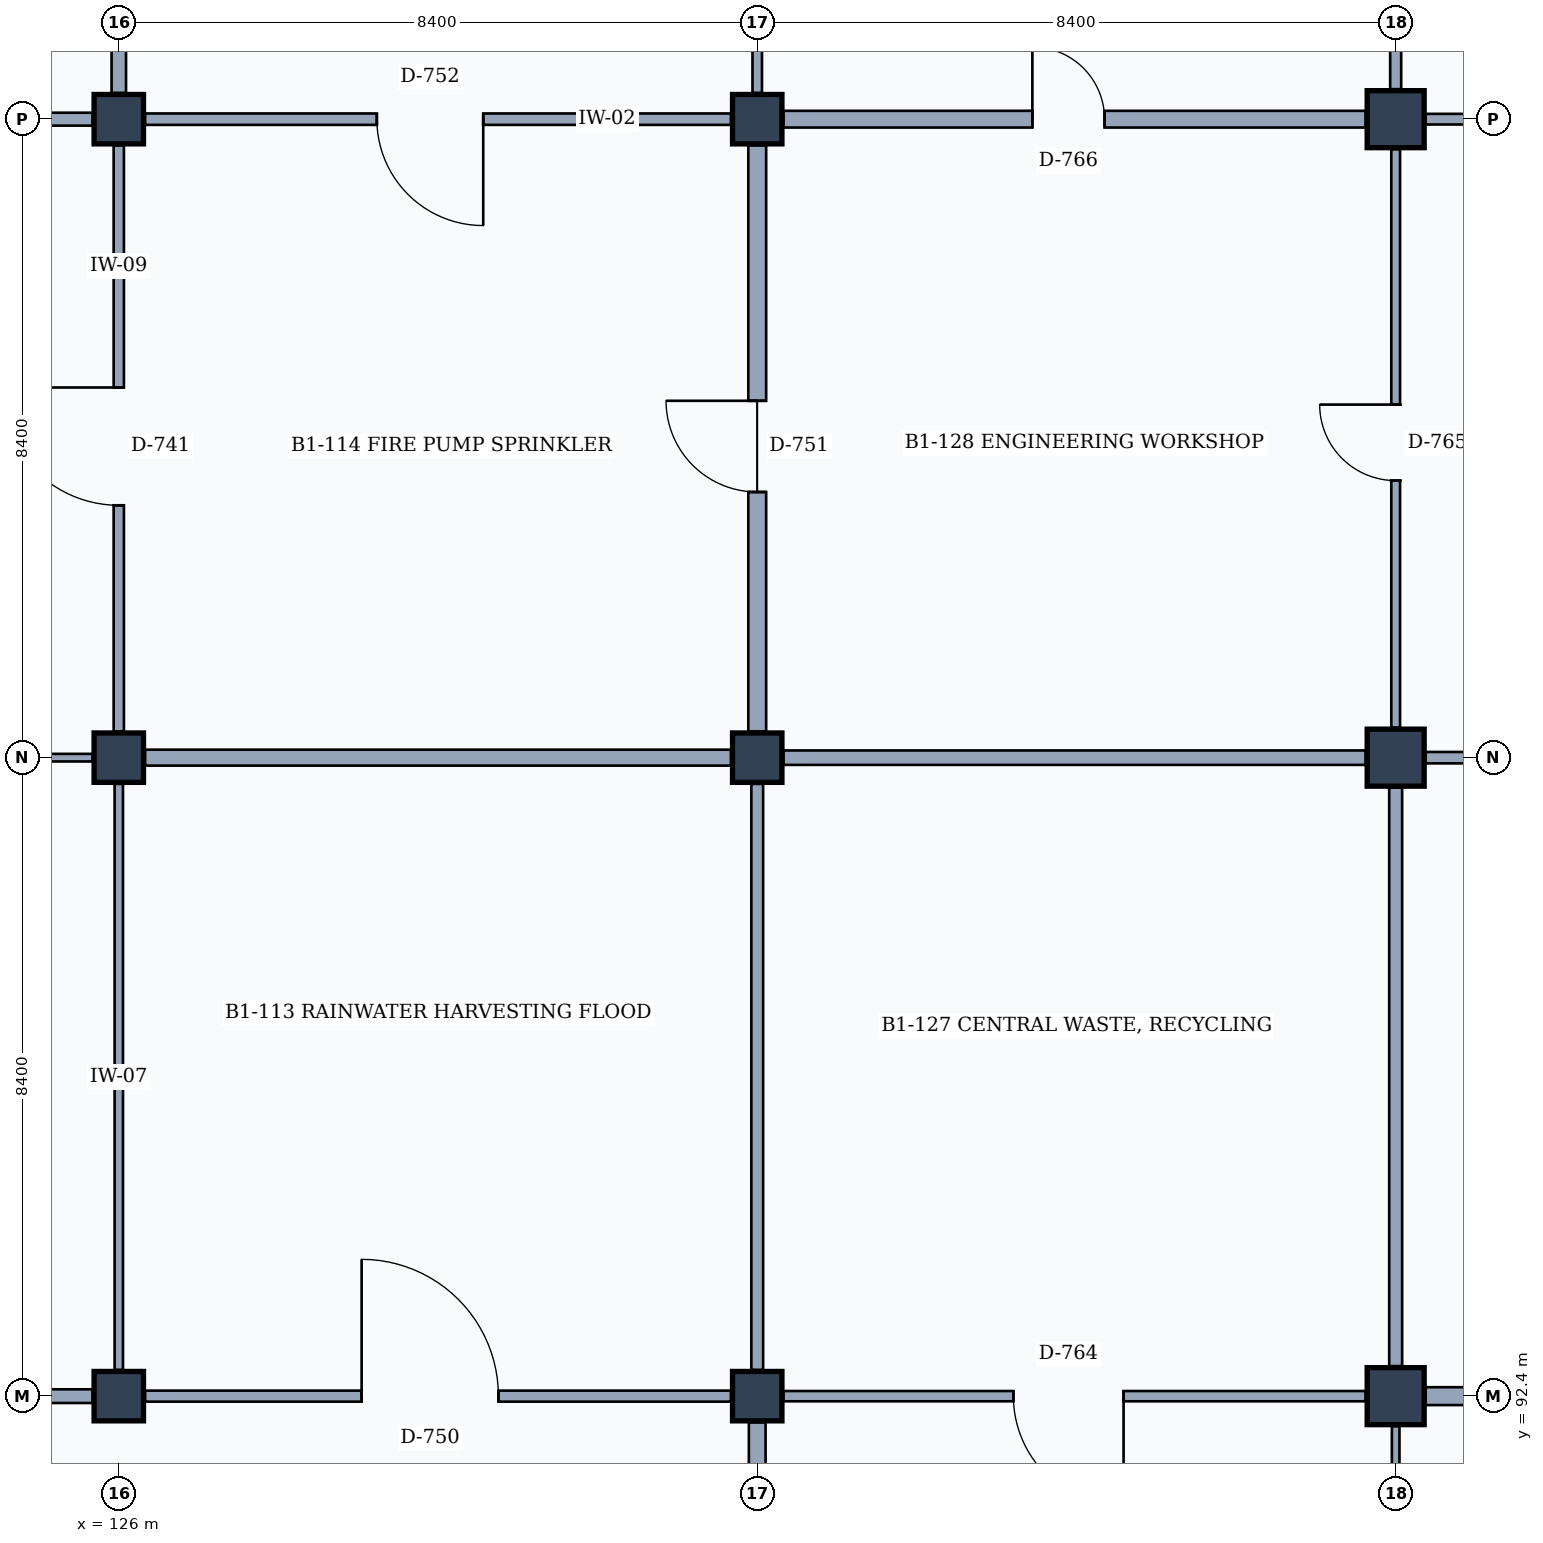
"""IFC4 building model, lengths in metres.
Left out: names, types, materials, properties, quantities, classifications, styles, units other than length and angle.
Written with IfcOpenShell. Run it as: python <this file> out.ifc"""

import sys

from ifc_helpers import new_model, si_unit, direction, frame, frame_2d, origin, origin_2d, place, context, subcontext, project, spatial, rectangle, extrude, element, fill, save


model = new_model("IFC4")
c1 = context("Model", 3, precision=1e-05, world=origin(), true_north=direction((0.0, 1.0)))
c2 = subcontext(c1, "Body", "Model", "MODEL_VIEW")
j1 = project(units=[si_unit("LENGTHUNIT", "METRE"), si_unit("PLANEANGLEUNIT", "RADIAN")], contexts=[c1])
p1 = place(None, origin())
s1 = spatial("IfcSite", under=j1, at=p1, CompositionType="ELEMENT")
p2 = place(p1, origin())
s2 = spatial("IfcBuilding", under=s1, at=p2, CompositionType="ELEMENT")
p3 = place(p2, frame((0.0, 0.0, -4.2)))
s3 = spatial("IfcBuildingStorey", under=s2, at=p3, CompositionType="ELEMENT", Elevation=-4.2)
for number, where, z_axis, x_axis in (
    (1, (126.0, 92.4, 0.0), (0.0, 0.0, 1.0), (1.0, 0.0, 0.0)),
    (2, (126.0, 100.8, 0.0), (0.0, 0.0, 1.0), (1.0, 0.0, 0.0)),
    (3, (126.0, 109.2, 0.0), (0.0, 0.0, 1.0), (1.0, 0.0, 0.0)),
    (4, (134.4, 92.4, 0.0), (0.0, 0.0, 1.0), (1.0, 0.0, 0.0)),
    (5, (134.4, 100.8, 0.0), (0.0, 0.0, 1.0), (1.0, 0.0, 0.0)),
    (6, (134.4, 109.2, 0.0), (0.0, 0.0, 1.0), (1.0, 0.0, 0.0)),
):
    element("IfcColumn", number, at=place(p3, frame(where, z_axis=z_axis, x_axis=x_axis)), inside=s3, PredefinedType="COLUMN", context=c2, shape_type="SweptSolid", body=[
        extrude(rectangle(XDim=0.65, YDim=0.65, at=origin_2d()), origin(), (0.0, 0.0, 1.0), 4.2),
    ])
for number, where, z_axis, x_axis in (
    (7, (142.8, 92.4, 0.0), (0.0, 0.0, 1.0), (1.0, 0.0, 0.0)),
    (8, (142.8, 100.8, 0.0), (0.0, 0.0, 1.0), (1.0, 0.0, 0.0)),
    (9, (142.8, 109.2, 0.0), (0.0, 0.0, 1.0), (1.0, 0.0, 0.0)),
):
    element("IfcColumn", number, at=place(p3, frame(where, z_axis=z_axis, x_axis=x_axis)), inside=s3, PredefinedType="COLUMN", context=c2, shape_type="SweptSolid", body=[
        extrude(rectangle(XDim=0.75, YDim=0.75, at=origin_2d()), origin(), (0.0, 0.0, 1.0), 4.2),
    ])
p4 = place(p3, frame((117.945, 92.4, 0.0), z_axis=(0.0, 0.0, 1.0), x_axis=(1.0, 0.0, 0.0)))
e10 = element("IfcWall", 10, at=p4, inside=s3, PredefinedType="PARTITIONING", context=c2, shape_type="SweptSolid", body=[
    extrude(rectangle(XDim=7.71, YDim=0.18, at=frame_2d((3.855, 0.0))), origin(), (0.0, 0.0, 1.0), 2.93),
])
p5 = place(p4, frame((3.1, 0.0, 0.0)))
e11 = element("IfcOpeningElement", 11, at=p5, cuts=e10, PredefinedType="OPENING", context=c2, shape_type="SweptSolid", body=[
    extrude(rectangle(XDim=1.3, YDim=2.2, at=frame_2d((0.65, 1.1))), frame((0.0, 0.1, 0.0), z_axis=(0.0, -1.0, 0.0), x_axis=(1.0, 0.0, 0.0)), (0.0, 0.0, 1.0), 0.2),
])
p6 = place(p3, frame((126.0, 92.745, 0.0), z_axis=(0.0, 0.0, 1.0), x_axis=(0.0, 1.0, 0.0)))
e12 = element("IfcWall", 12, at=p6, inside=s3, PredefinedType="PARTITIONING", context=c2, shape_type="SweptSolid", body=[
    extrude(rectangle(XDim=7.71, YDim=0.11, at=frame_2d((3.855, 0.0))), origin(), (0.0, 0.0, 1.0), 3.23),
])
p7 = place(p3, frame((117.945, 100.8, 0.0), z_axis=(0.0, 0.0, 1.0), x_axis=(1.0, 0.0, 0.0)))
e13 = element("IfcWall", 13, at=p7, inside=s3, PredefinedType="MOVABLE", context=c2, shape_type="SweptSolid", body=[
    extrude(rectangle(XDim=7.71, YDim=0.1, at=frame_2d((3.855, 0.0))), origin(), (0.0, 0.0, 1.0), 2.93),
])
p8 = place(p3, frame((126.0, 101.145, 0.0), z_axis=(0.0, 0.0, 1.0), x_axis=(0.0, 1.0, 0.0)))
e14 = element("IfcWall", 14, at=p8, inside=s3, PredefinedType="PARTITIONING", context=c2, shape_type="SweptSolid", body=[
    extrude(rectangle(XDim=7.71, YDim=0.135, at=frame_2d((3.855, 0.0))), origin(), (0.0, 0.0, 1.0), 3.23),
])
p9 = place(p8, frame((2.975, 0.0, 0.0)))
e15 = element("IfcOpeningElement", 15, at=p9, cuts=e14, PredefinedType="OPENING", context=c2, shape_type="SweptSolid", body=[
    extrude(rectangle(XDim=1.55, YDim=2.35, at=frame_2d((0.775, 1.175))), frame((0.0, 0.077, 0.0), z_axis=(0.0, -1.0, 0.0), x_axis=(1.0, 0.0, 0.0)), (0.0, 0.0, 1.0), 0.155),
])
p10 = place(p3, frame((117.945, 109.2, 0.0), z_axis=(0.0, 0.0, 1.0), x_axis=(1.0, 0.0, 0.0)))
e16 = element("IfcWall", 16, at=p10, inside=s3, PredefinedType="PARTITIONING", context=c2, shape_type="SweptSolid", body=[
    extrude(rectangle(XDim=7.71, YDim=0.17, at=frame_2d((3.855, 0.0))), origin(), (0.0, 0.0, 1.0), 2.93),
])
p11 = place(p10, frame((2.9, 0.0, 0.0)))
e17 = element("IfcOpeningElement", 17, at=p11, cuts=e16, PredefinedType="OPENING", context=c2, shape_type="SweptSolid", body=[
    extrude(rectangle(XDim=1.7, YDim=2.3, at=frame_2d((0.85, 1.15))), frame((0.0, 0.095, 0.0), z_axis=(0.0, -1.0, 0.0), x_axis=(1.0, 0.0, 0.0)), (0.0, 0.0, 1.0), 0.19),
])
p12 = place(p3, frame((126.0, 109.545, 0.0), z_axis=(0.0, 0.0, 1.0), x_axis=(0.0, 1.0, 0.0)))
e18 = element("IfcWall", 18, at=p12, inside=s3, PredefinedType="PARTITIONING", context=c2, shape_type="SweptSolid", body=[
    extrude(rectangle(XDim=7.71, YDim=0.19, at=frame_2d((3.855, 0.0))), origin(), (0.0, 0.0, 1.0), 3.23),
])
p13 = place(p3, frame((134.4, 84.345, 0.0), z_axis=(0.0, 0.0, 1.0), x_axis=(0.0, 1.0, 0.0)))
e19 = element("IfcWall", 19, at=p13, inside=s3, PredefinedType="PARTITIONING", context=c2, shape_type="SweptSolid", body=[
    extrude(rectangle(XDim=7.71, YDim=0.22, at=frame_2d((3.855, 0.0))), origin(), (0.0, 0.0, 1.0), 3.08),
])
p14 = place(p3, frame((126.345, 92.4, 0.0), z_axis=(0.0, 0.0, 1.0), x_axis=(1.0, 0.0, 0.0)))
e20 = element("IfcWall", 20, at=p14, inside=s3, PredefinedType="PARTITIONING", context=c2, shape_type="SweptSolid", body=[
    extrude(rectangle(XDim=7.71, YDim=0.145, at=frame_2d((3.855, 0.0))), origin(), (0.0, 0.0, 1.0), 2.93),
])
p15 = place(p14, frame((2.85, 0.0, 0.0)))
e21 = element("IfcOpeningElement", 21, at=p15, cuts=e20, PredefinedType="OPENING", context=c2, shape_type="SweptSolid", body=[
    extrude(rectangle(XDim=1.8, YDim=2.3, at=frame_2d((0.9, 1.15))), frame((0.0, 0.083, 0.0), z_axis=(0.0, -1.0, 0.0), x_axis=(1.0, 0.0, 0.0)), (0.0, 0.0, 1.0), 0.165),
])
p16 = place(p3, frame((134.4, 92.745, 0.0), z_axis=(0.0, 0.0, 1.0), x_axis=(0.0, 1.0, 0.0)))
e22 = element("IfcWall", 22, at=p16, inside=s3, PredefinedType="PARTITIONING", context=c2, shape_type="SweptSolid", body=[
    extrude(rectangle(XDim=7.71, YDim=0.155, at=frame_2d((3.855, 0.0))), origin(), (0.0, 0.0, 1.0), 3.08),
])
p17 = place(p3, frame((126.345, 100.8, 0.0), z_axis=(0.0, 0.0, 1.0), x_axis=(1.0, 0.0, 0.0)))
e23 = element("IfcWall", 23, at=p17, inside=s3, PredefinedType="PARTITIONING", context=c2, shape_type="SweptSolid", body=[
    extrude(rectangle(XDim=7.71, YDim=0.21, at=frame_2d((3.855, 0.0))), origin(), (0.0, 0.0, 1.0), 2.93),
])
p18 = place(p3, frame((134.4, 101.145, 0.0), z_axis=(0.0, 0.0, 1.0), x_axis=(0.0, 1.0, 0.0)))
e24 = element("IfcWall", 24, at=p18, inside=s3, PredefinedType="PARTITIONING", context=c2, shape_type="SweptSolid", body=[
    extrude(rectangle(XDim=7.71, YDim=0.235, at=frame_2d((3.855, 0.0))), origin(), (0.0, 0.0, 1.0), 3.08),
])
p19 = place(p18, frame((3.15, 0.0, 0.0)))
e25 = element("IfcOpeningElement", 25, at=p19, cuts=e24, PredefinedType="OPENING", context=c2, shape_type="SweptSolid", body=[
    extrude(rectangle(XDim=1.2, YDim=2.2, at=frame_2d((0.6, 1.1))), frame((0.0, 0.127, 0.0), z_axis=(0.0, -1.0, 0.0), x_axis=(1.0, 0.0, 0.0)), (0.0, 0.0, 1.0), 0.255),
])
p20 = place(p3, frame((126.345, 109.2, 0.0), z_axis=(0.0, 0.0, 1.0), x_axis=(1.0, 0.0, 0.0)))
e26 = element("IfcWall", 26, at=p20, inside=s3, PredefinedType="PARTITIONING", context=c2, shape_type="SweptSolid", body=[
    extrude(rectangle(XDim=7.71, YDim=0.15, at=frame_2d((3.855, 0.0))), origin(), (0.0, 0.0, 1.0), 2.93),
])
p21 = place(p20, frame((3.05, 0.0, 0.0)))
e27 = element("IfcOpeningElement", 27, at=p21, cuts=e26, PredefinedType="OPENING", context=c2, shape_type="SweptSolid", body=[
    extrude(rectangle(XDim=1.4, YDim=2.25, at=frame_2d((0.7, 1.125))), frame((0.0, 0.085, 0.0), z_axis=(0.0, -1.0, 0.0), x_axis=(1.0, 0.0, 0.0)), (0.0, 0.0, 1.0), 0.17),
])
p22 = place(p3, frame((134.4, 109.545, 0.0), z_axis=(0.0, 0.0, 1.0), x_axis=(0.0, 1.0, 0.0)))
e28 = element("IfcWall", 28, at=p22, inside=s3, PredefinedType="PARTITIONING", context=c2, shape_type="SweptSolid", body=[
    extrude(rectangle(XDim=7.71, YDim=0.125, at=frame_2d((3.855, 0.0))), origin(), (0.0, 0.0, 1.0), 3.08),
])
p23 = place(p3, frame((142.8, 84.395, 0.0), z_axis=(0.0, 0.0, 1.0), x_axis=(0.0, 1.0, 0.0)))
e29 = element("IfcWall", 29, at=p23, inside=s3, PredefinedType="MOVABLE", context=c2, shape_type="SweptSolid", body=[
    extrude(rectangle(XDim=7.61, YDim=0.1, at=frame_2d((3.805, 0.0))), origin(), (0.0, 0.0, 1.0), 3.1),
])
p24 = place(p3, frame((134.745, 92.4, 0.0), z_axis=(0.0, 0.0, 1.0), x_axis=(1.0, 0.0, 0.0)))
e30 = element("IfcWall", 30, at=p24, inside=s3, PredefinedType="PARTITIONING", context=c2, shape_type="SweptSolid", body=[
    extrude(rectangle(XDim=7.66, YDim=0.135, at=frame_2d((3.83, 0.0))), origin(), (0.0, 0.0, 1.0), 3.03),
])
p25 = place(p24, frame((3.025, 0.0, 0.0)))
e31 = element("IfcOpeningElement", 31, at=p25, cuts=e30, PredefinedType="OPENING", context=c2, shape_type="SweptSolid", body=[
    extrude(rectangle(XDim=1.45, YDim=2.35, at=frame_2d((0.725, 1.175))), frame((0.0, 0.077, 0.0), z_axis=(0.0, -1.0, 0.0), x_axis=(1.0, 0.0, 0.0)), (0.0, 0.0, 1.0), 0.155),
])
p26 = place(p3, frame((142.8, 92.795, 0.0), z_axis=(0.0, 0.0, 1.0), x_axis=(0.0, 1.0, 0.0)))
e32 = element("IfcWall", 32, at=p26, inside=s3, PredefinedType="PARTITIONING", context=c2, shape_type="SweptSolid", body=[
    extrude(rectangle(XDim=7.61, YDim=0.17, at=frame_2d((3.805, 0.0))), origin(), (0.0, 0.0, 1.0), 3.1),
])
p27 = place(p3, frame((134.745, 100.8, 0.0), z_axis=(0.0, 0.0, 1.0), x_axis=(1.0, 0.0, 0.0)))
e33 = element("IfcWall", 33, at=p27, inside=s3, PredefinedType="PARTITIONING", context=c2, shape_type="SweptSolid", body=[
    extrude(rectangle(XDim=7.66, YDim=0.19, at=frame_2d((3.83, 0.0))), origin(), (0.0, 0.0, 1.0), 3.03),
])
p28 = place(p3, frame((142.8, 101.195, 0.0), z_axis=(0.0, 0.0, 1.0), x_axis=(0.0, 1.0, 0.0)))
e34 = element("IfcWall", 34, at=p28, inside=s3, PredefinedType="PARTITIONING", context=c2, shape_type="SweptSolid", body=[
    extrude(rectangle(XDim=7.61, YDim=0.115, at=frame_2d((3.805, 0.0))), origin(), (0.0, 0.0, 1.0), 3.1),
])
p29 = place(p28, frame((3.25, 0.0, 0.0)))
e35 = element("IfcOpeningElement", 35, at=p29, cuts=e34, PredefinedType="OPENING", context=c2, shape_type="SweptSolid", body=[
    extrude(rectangle(XDim=1.0, YDim=2.15, at=frame_2d((0.5, 1.075))), frame((0.0, 0.067, 0.0), z_axis=(0.0, -1.0, 0.0), x_axis=(1.0, 0.0, 0.0)), (0.0, 0.0, 1.0), 0.135),
])
p30 = place(p3, frame((134.745, 109.2, 0.0), z_axis=(0.0, 0.0, 1.0), x_axis=(1.0, 0.0, 0.0)))
e36 = element("IfcWall", 36, at=p30, inside=s3, PredefinedType="PARTITIONING", context=c2, shape_type="SweptSolid", body=[
    extrude(rectangle(XDim=7.66, YDim=0.22, at=frame_2d((3.83, 0.0))), origin(), (0.0, 0.0, 1.0), 3.03),
])
p31 = place(p30, frame((3.275, 0.0, 0.0)))
e37 = element("IfcOpeningElement", 37, at=p31, cuts=e36, PredefinedType="OPENING", context=c2, shape_type="SweptSolid", body=[
    extrude(rectangle(XDim=0.95, YDim=2.15, at=frame_2d((0.475, 1.075))), frame((0.0, 0.12, 0.0), z_axis=(0.0, -1.0, 0.0), x_axis=(1.0, 0.0, 0.0)), (0.0, 0.0, 1.0), 0.24),
])
p32 = place(p3, frame((142.8, 109.595, 0.0), z_axis=(0.0, 0.0, 1.0), x_axis=(0.0, 1.0, 0.0)))
e38 = element("IfcWall", 38, at=p32, inside=s3, PredefinedType="PARTITIONING", context=c2, shape_type="SweptSolid", body=[
    extrude(rectangle(XDim=7.61, YDim=0.145, at=frame_2d((3.805, 0.0))), origin(), (0.0, 0.0, 1.0), 3.1),
])
p33 = place(p3, frame((143.195, 92.4, 0.0), z_axis=(0.0, 0.0, 1.0), x_axis=(1.0, 0.0, 0.0)))
e39 = element("IfcWall", 39, at=p33, inside=s3, PredefinedType="PARTITIONING", context=c2, shape_type="SweptSolid", body=[
    extrude(rectangle(XDim=7.56, YDim=0.235, at=frame_2d((3.78, 0.0))), origin(), (0.0, 0.0, 1.0), 3.05),
])
p34 = place(p33, frame((2.8, 0.0, 0.0)))
e40 = element("IfcOpeningElement", 40, at=p34, cuts=e39, PredefinedType="OPENING", context=c2, shape_type="SweptSolid", body=[
    extrude(rectangle(XDim=1.9, YDim=2.4, at=frame_2d((0.95, 1.2))), frame((0.0, 0.127, 0.0), z_axis=(0.0, -1.0, 0.0), x_axis=(1.0, 0.0, 0.0)), (0.0, 0.0, 1.0), 0.255),
])
p35 = place(p3, frame((143.195, 100.8, 0.0), z_axis=(0.0, 0.0, 1.0), x_axis=(1.0, 0.0, 0.0)))
e41 = element("IfcWall", 41, at=p35, inside=s3, PredefinedType="PARTITIONING", context=c2, shape_type="SweptSolid", body=[
    extrude(rectangle(XDim=7.56, YDim=0.15, at=frame_2d((3.78, 0.0))), origin(), (0.0, 0.0, 1.0), 3.05),
])
p36 = place(p3, frame((143.195, 109.2, 0.0), z_axis=(0.0, 0.0, 1.0), x_axis=(1.0, 0.0, 0.0)))
e42 = element("IfcWall", 42, at=p36, inside=s3, PredefinedType="PARTITIONING", context=c2, shape_type="SweptSolid", body=[
    extrude(rectangle(XDim=7.61, YDim=0.14, at=frame_2d((3.805, 0.0))), origin(), (0.0, 0.0, 1.0), 3.05),
])
p37 = place(p36, frame((3.125, 0.0, 0.0)))
e43 = element("IfcOpeningElement", 43, at=p37, cuts=e42, PredefinedType="OPENING", context=c2, shape_type="SweptSolid", body=[
    extrude(rectangle(XDim=1.25, YDim=2.3, at=frame_2d((0.625, 1.15))), frame((0.0, 0.08, 0.0), z_axis=(0.0, -1.0, 0.0), x_axis=(1.0, 0.0, 0.0)), (0.0, 0.0, 1.0), 0.16),
])
p38 = place(p9, origin())
e44 = element("IfcDoor", 44, at=p38, inside=s3, OperationType="SINGLE_SWING_RIGHT", PredefinedType="DOOR", context=c2, shape_type="SweptSolid", body=[
    extrude(rectangle(XDim=1.55, YDim=2.35, at=frame_2d((0.775, 1.175))), frame((0.0, 0.025, 0.0), z_axis=(0.0, -1.0, 0.0), x_axis=(1.0, 0.0, 0.0)), (0.0, 0.0, 1.0), 0.05),
])
fill(e15, e44)
p39 = place(p15, origin())
e45 = element("IfcDoor", 45, at=p39, inside=s3, OperationType="SINGLE_SWING_LEFT", PredefinedType="DOOR", context=c2, shape_type="SweptSolid", body=[
    extrude(rectangle(XDim=1.8, YDim=2.3, at=frame_2d((0.9, 1.15))), frame((0.0, 0.025, 0.0), z_axis=(0.0, -1.0, 0.0), x_axis=(1.0, 0.0, 0.0)), (0.0, 0.0, 1.0), 0.05),
])
fill(e21, e45)
p40 = place(p19, origin())
e46 = element("IfcDoor", 46, at=p40, inside=s3, OperationType="SINGLE_SWING_RIGHT", PredefinedType="DOOR", context=c2, shape_type="SweptSolid", body=[
    extrude(rectangle(XDim=1.2, YDim=2.2, at=frame_2d((0.6, 1.1))), frame((0.0, 0.025, 0.0), z_axis=(0.0, -1.0, 0.0), x_axis=(1.0, 0.0, 0.0)), (0.0, 0.0, 1.0), 0.05),
])
fill(e25, e46)
p41 = place(p21, frame((1.4, 0.0, 0.0), z_axis=(0.0, 0.0, 1.0), x_axis=(-1.0, 0.0, 0.0)))
e47 = element("IfcDoor", 47, at=p41, inside=s3, OperationType="SINGLE_SWING_LEFT", PredefinedType="DOOR", context=c2, shape_type="SweptSolid", body=[
    extrude(rectangle(XDim=1.4, YDim=2.25, at=frame_2d((0.7, 1.125))), frame((0.0, 0.025, 0.0), z_axis=(0.0, -1.0, 0.0), x_axis=(1.0, 0.0, 0.0)), (0.0, 0.0, 1.0), 0.05),
])
fill(e27, e47)
p42 = place(p25, frame((1.45, 0.0, 0.0), z_axis=(0.0, 0.0, 1.0), x_axis=(-1.0, 0.0, 0.0)))
e48 = element("IfcDoor", 48, at=p42, inside=s3, OperationType="SINGLE_SWING_LEFT", PredefinedType="DOOR", context=c2, shape_type="SweptSolid", body=[
    extrude(rectangle(XDim=1.45, YDim=2.35, at=frame_2d((0.725, 1.175))), frame((0.0, 0.025, 0.0), z_axis=(0.0, -1.0, 0.0), x_axis=(1.0, 0.0, 0.0)), (0.0, 0.0, 1.0), 0.05),
])
fill(e31, e48)
p43 = place(p29, origin())
e49 = element("IfcDoor", 49, at=p43, inside=s3, OperationType="SINGLE_SWING_RIGHT", PredefinedType="DOOR", context=c2, shape_type="SweptSolid", body=[
    extrude(rectangle(XDim=1.0, YDim=2.15, at=frame_2d((0.5, 1.075))), frame((0.0, 0.025, 0.0), z_axis=(0.0, -1.0, 0.0), x_axis=(1.0, 0.0, 0.0)), (0.0, 0.0, 1.0), 0.05),
])
fill(e35, e49)
p44 = place(p31, origin())
e50 = element("IfcDoor", 50, at=p44, inside=s3, OperationType="SINGLE_SWING_LEFT", PredefinedType="DOOR", context=c2, shape_type="SweptSolid", body=[
    extrude(rectangle(XDim=0.95, YDim=2.15, at=frame_2d((0.475, 1.075))), frame((0.0, 0.025, 0.0), z_axis=(0.0, -1.0, 0.0), x_axis=(1.0, 0.0, 0.0)), (0.0, 0.0, 1.0), 0.05),
])
fill(e37, e50)
save(model, sys.argv[1])
